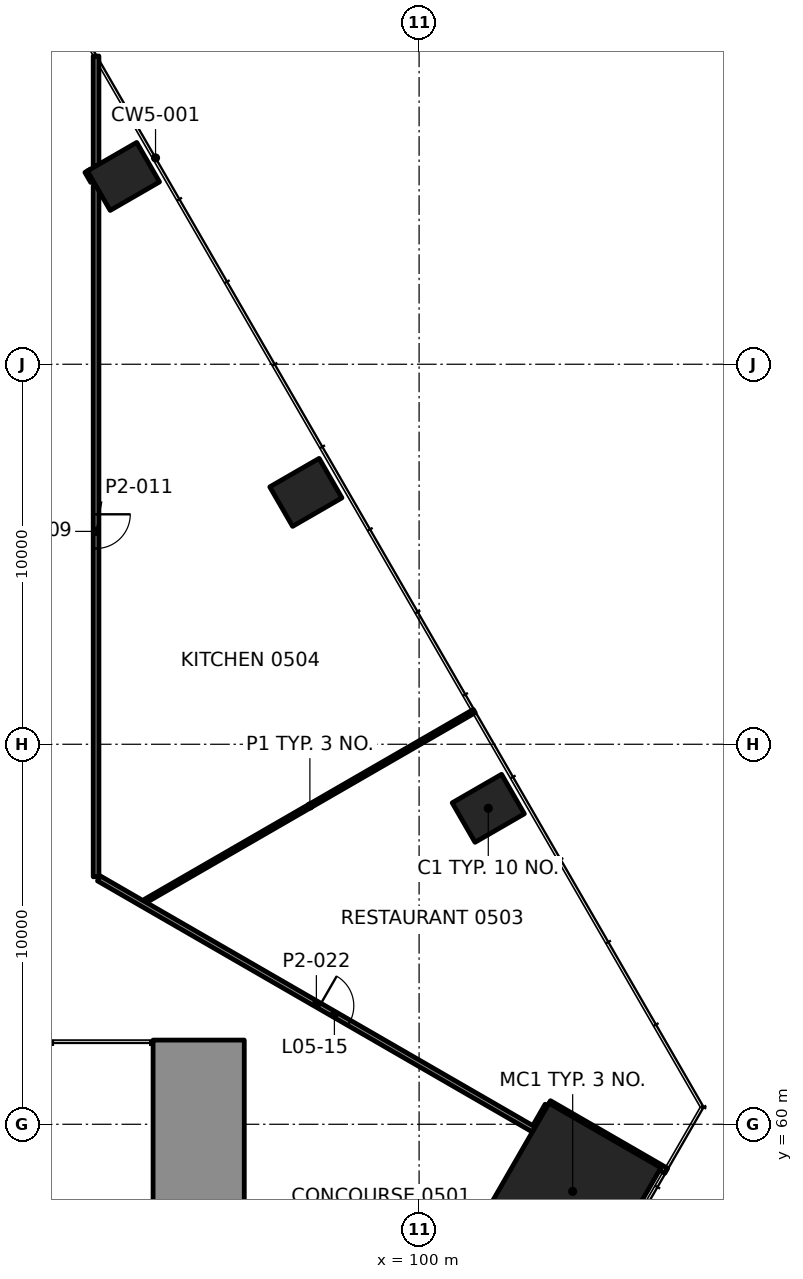
"""IFC4 building model, lengths in metres.
Left out: names, types, materials, properties, quantities, classifications, styles, units other than length and angle.
Written with IfcOpenShell. Run it as: python <this file> out.ifc"""

import sys

from ifc_helpers import new_model, si_unit, direction, frame, frame_2d, origin, origin_2d, place, context, subcontext, project, spatial, polyline, rectangle, outline, extrude, element, fill, save


model = new_model("IFC4")
c1 = context("Model", 3, precision=1e-05, world=origin(), true_north=direction((0.0, 1.0)))
c2 = subcontext(c1, "Body", "Model", "MODEL_VIEW")
j1 = project(units=[si_unit("LENGTHUNIT", "METRE"), si_unit("PLANEANGLEUNIT", "RADIAN")], contexts=[c1])
p1 = place(None, origin())
s1 = spatial("IfcSite", under=j1, at=p1, CompositionType="ELEMENT")
p2 = place(p1, origin())
s2 = spatial("IfcBuilding", under=s1, at=p2, CompositionType="ELEMENT")
p3 = place(p2, frame((0.0, 0.0, 26.4)))
s3 = spatial("IfcBuildingStorey", under=s2, at=p3, CompositionType="ELEMENT", Elevation=26.4)
p4 = place(p3, frame((94.2, 54.215, 0.0), z_axis=(0.0, 0.0, 1.0), x_axis=(0.0, 1.0, 0.0)))
e1 = element("IfcWall", 1, at=p4, inside=s3, PredefinedType="SHEAR", context=c2, shape_type="SweptSolid", body=[
    extrude(rectangle(XDim=8.0, YDim=2.4, at=frame_2d((4.0, 0.0))), origin(), (0.0, 0.0, 1.0), 4.6),
])
p5 = place(p3, frame((104.041, 58.233, 0.0), z_axis=(0.0, 0.0, 1.0), x_axis=(0.5, 0.866025403784, 0.0)))
e2 = element("IfcColumn", 2, at=p5, inside=s3, PredefinedType="COLUMN", context=c2, shape_type="SweptSolid", body=[
    extrude(rectangle(XDim=3.4, YDim=3.4, at=origin_2d()), origin(), (0.0, 0.0, 1.0), 4.6),
])
for number, where, z_axis, x_axis in (
    (3, (101.821, 68.315, -0.0), (0.0, 0.0, 1.0), (-0.5, 0.866, 0.0)),
    (4, (97.021, 76.628, -0.0), (0.0, 0.0, 1.0), (-0.5, 0.866, 0.0)),
    (5, (92.22, 84.942, -0.0), (0.0, 0.0, 1.0), (-0.5, 0.866, 0.0)),
):
    element("IfcColumn", number, at=place(p3, frame(where, z_axis=z_axis, x_axis=x_axis)), inside=s3, PredefinedType="COLUMN", context=c2, shape_type="SweptSolid", body=[
        extrude(rectangle(XDim=1.2, YDim=1.5, at=origin_2d()), origin(), (0.0, 0.0, 1.0), 4.6),
    ])
p6 = place(p3, frame((92.801, 65.878, 0.0), z_axis=(0.0, 0.0, 1.0), x_axis=(0.86602359872, 0.50000312645, 0.0)))
e6 = element("IfcWall", 6, at=p6, inside=s3, PredefinedType="PARTITIONING", context=c2, shape_type="SweptSolid", body=[
    extrude(rectangle(XDim=9.989, YDim=0.1, at=frame_2d((4.995, 0.0))), origin(), (0.0, 0.0, 1.0), 3.315),
])
p7 = place(p3, frame((103.062, 59.936, 0.0), z_axis=(0.0, 0.0, 1.0), x_axis=(0.500163094741, 0.865931220513, 0.0)))
e7 = element("IfcWall", 7, at=p7, inside=s3, PredefinedType="PARTITIONING", context=c2, shape_type="SweptSolid", body=[
    extrude(rectangle(XDim=0.639, YDim=0.15, at=frame_2d((0.32, 0.0))), origin(), (0.0, 0.0, 1.0), 3.55),
])
p8 = place(p3, frame((91.5, 84.69, 0.0), z_axis=(0.0, 0.0, 1.0), x_axis=(0.0, -1.0, 0.0)))
e8 = element("IfcWall", 8, at=p8, inside=s3, PredefinedType="PARTITIONING", context=c2, shape_type="SweptSolid", body=[
    extrude(rectangle(XDim=18.177, YDim=0.15, at=frame_2d((9.089, 0.0))), origin(), (0.0, 0.0, 1.0), 3.55),
])
p9 = place(p8, frame((8.639, 0.0, 0.0)))
e9 = element("IfcOpeningElement", 9, at=p9, cuts=e8, PredefinedType="OPENING", context=c2, shape_type="SweptSolid", body=[
    extrude(rectangle(XDim=0.9, YDim=2.1, at=frame_2d((0.45, 1.05))), frame((0.0, 0.085, 0.0), z_axis=(0.0, -1.0, 0.0), x_axis=(1.0, 0.0, 0.0)), (0.0, 0.0, 1.0), 0.17),
])
p10 = place(p3, frame((91.5, 85.219, 0.0), z_axis=(0.0, 0.0, 1.0), x_axis=(0.0, 1.0, 0.0)))
e10 = element("IfcWall", 10, at=p10, inside=s3, PredefinedType="PARTITIONING", context=c2, shape_type="SweptSolid", body=[
    extrude(rectangle(XDim=2.891, YDim=0.15, at=frame_2d((1.445, 0.0))), origin(), (0.0, 0.0, 1.0), 3.315),
])
p11 = place(p3, frame((91.425, 84.821, 0.0), z_axis=(0.0, 0.0, 1.0), x_axis=(-0.4998141712, 0.866132665513, 0.0)))
e11 = element("IfcWall", 11, at=p11, inside=s3, PredefinedType="PARTITIONING", context=c2, shape_type="SweptSolid", body=[
    extrude(rectangle(XDim=0.307, YDim=0.15, at=frame_2d((0.154, 0.0))), origin(), (0.0, 0.0, 1.0), 3.55),
])
p12 = place(p3, frame((106.502, 58.775, 0.0), z_axis=(0.0, 0.0, 1.0), x_axis=(-0.866014251095, 0.500019316528, 0.0)))
e12 = element("IfcWall", 12, at=p12, inside=s3, PredefinedType="PARTITIONING", context=c2, shape_type="SweptSolid", body=[
    extrude(rectangle(XDim=3.559, YDim=0.15, at=frame_2d((1.78, 0.0))), origin(), (0.0, 0.0, 1.0), 3.55),
])
p13 = place(p3, frame((91.575, 66.47, 0.0), z_axis=(0.0, 0.0, 1.0), x_axis=(0.866027754727, -0.499995928025, 0.0)))
e13 = element("IfcWall", 13, at=p13, inside=s3, PredefinedType="PARTITIONING", context=c2, shape_type="SweptSolid", body=[
    extrude(rectangle(XDim=13.214, YDim=0.15, at=frame_2d((6.607, 0.0))), origin(), (0.0, 0.0, 1.0), 3.55),
])
p14 = place(p13, frame((6.705, 0.0, 0.0)))
e14 = element("IfcOpeningElement", 14, at=p14, cuts=e13, PredefinedType="OPENING", context=c2, shape_type="SweptSolid", body=[
    extrude(rectangle(XDim=0.9, YDim=2.1, at=frame_2d((0.45, 1.05))), frame((0.0, 0.085, 0.0), z_axis=(0.0, -1.0, 0.0), x_axis=(1.0, 0.0, 0.0)), (0.0, 0.0, 1.0), 0.17),
])
p15 = place(p3, frame((103.938, 86.973, 0.0), z_axis=(0.0, 0.0, 1.0), x_axis=(0.86601877681, 0.50001147808, 0.0)))
e15 = element("IfcWall", 15, at=p15, inside=s3, PredefinedType="SOLIDWALL", context=c2, shape_type="SweptSolid", body=[
    extrude(outline(polyline([(0.0, 0.0), (19.474, 0.0), (19.474, 0.0), (17.883, 1.556), (16.067, 2.804), (14.064, 3.722), (11.933, 4.285), (9.737, 4.474), (7.542, 4.285), (5.411, 3.722), (3.408, 2.804), (1.591, 1.556), (0.0, 0.0), (0.0, 0.0)])), frame((0.0, 0.15, 0.0), z_axis=(0.0, -1.0, 0.0), x_axis=(1.0, 0.0, 0.0)), (0.0, 0.0, 1.0), 0.3),
])
p16 = place(p15, frame((8.237, 0.0, 1.0)))
e16 = element("IfcOpeningElement", 16, at=p16, cuts=e15, PredefinedType="OPENING", context=c2, shape_type="SweptSolid", body=[
    extrude(rectangle(XDim=3.0, YDim=2.6, at=frame_2d((1.5, 1.3))), frame((0.0, 0.16, 0.0), z_axis=(0.0, -1.0, 0.0), x_axis=(1.0, 0.0, 0.0)), (0.0, 0.0, 1.0), 0.32),
])
for number, where, z_axis, x_axis in (
    (17, (107.02, 62.31, 0.0), (0.0, 0.0, 1.0), (-0.5, 0.866, 0.0)),
    (18, (132.827, 77.21, 0.0), (0.0, 0.0, 1.0), (-0.5, 0.866, 0.0)),
):
    element("IfcWall", number, at=place(p3, frame(where, z_axis=z_axis, x_axis=x_axis)), inside=s3, PredefinedType="PARAPET", context=c2, shape_type="SweptSolid", body=[
        extrude(rectangle(XDim=54.0, YDim=0.2, at=frame_2d((27.0, 0.0))), origin(), (0.0, 0.0, 1.0), 1.1),
    ])
p17 = place(p3, frame((107.056, 62.446, 0.0), z_axis=(0.0, 0.0, 1.0), x_axis=(0.866029692796, 0.499992571141, 0.0)))
e19 = element("IfcWall", 19, at=p17, inside=s3, PredefinedType="PARAPET", context=c2, shape_type="SweptSolid", body=[
    extrude(rectangle(XDim=29.6, YDim=0.2, at=frame_2d((14.8, 0.0))), origin(), (0.0, 0.0, 1.0), 1.1),
])
p18 = place(p9, origin())
e20 = element("IfcDoor", 20, at=p18, inside=s3, OperationType="SINGLE_SWING_RIGHT", PredefinedType="DOOR", context=c2, shape_type="SweptSolid", body=[
    extrude(rectangle(XDim=0.9, YDim=2.1, at=frame_2d((0.45, 1.05))), frame((0.0, 0.025, 0.0), z_axis=(0.0, -1.0, 0.0), x_axis=(1.0, 0.0, 0.0)), (0.0, 0.0, 1.0), 0.05),
])
fill(e9, e20)
p19 = place(p14, origin())
e21 = element("IfcDoor", 21, at=p19, inside=s3, OperationType="SINGLE_SWING_LEFT", PredefinedType="DOOR", context=c2, shape_type="SweptSolid", body=[
    extrude(rectangle(XDim=0.9, YDim=2.1, at=frame_2d((0.45, 1.05))), frame((0.0, 0.025, 0.0), z_axis=(0.0, -1.0, 0.0), x_axis=(1.0, 0.0, 0.0)), (0.0, 0.0, 1.0), 0.05),
])
fill(e14, e21)
save(model, sys.argv[1])
